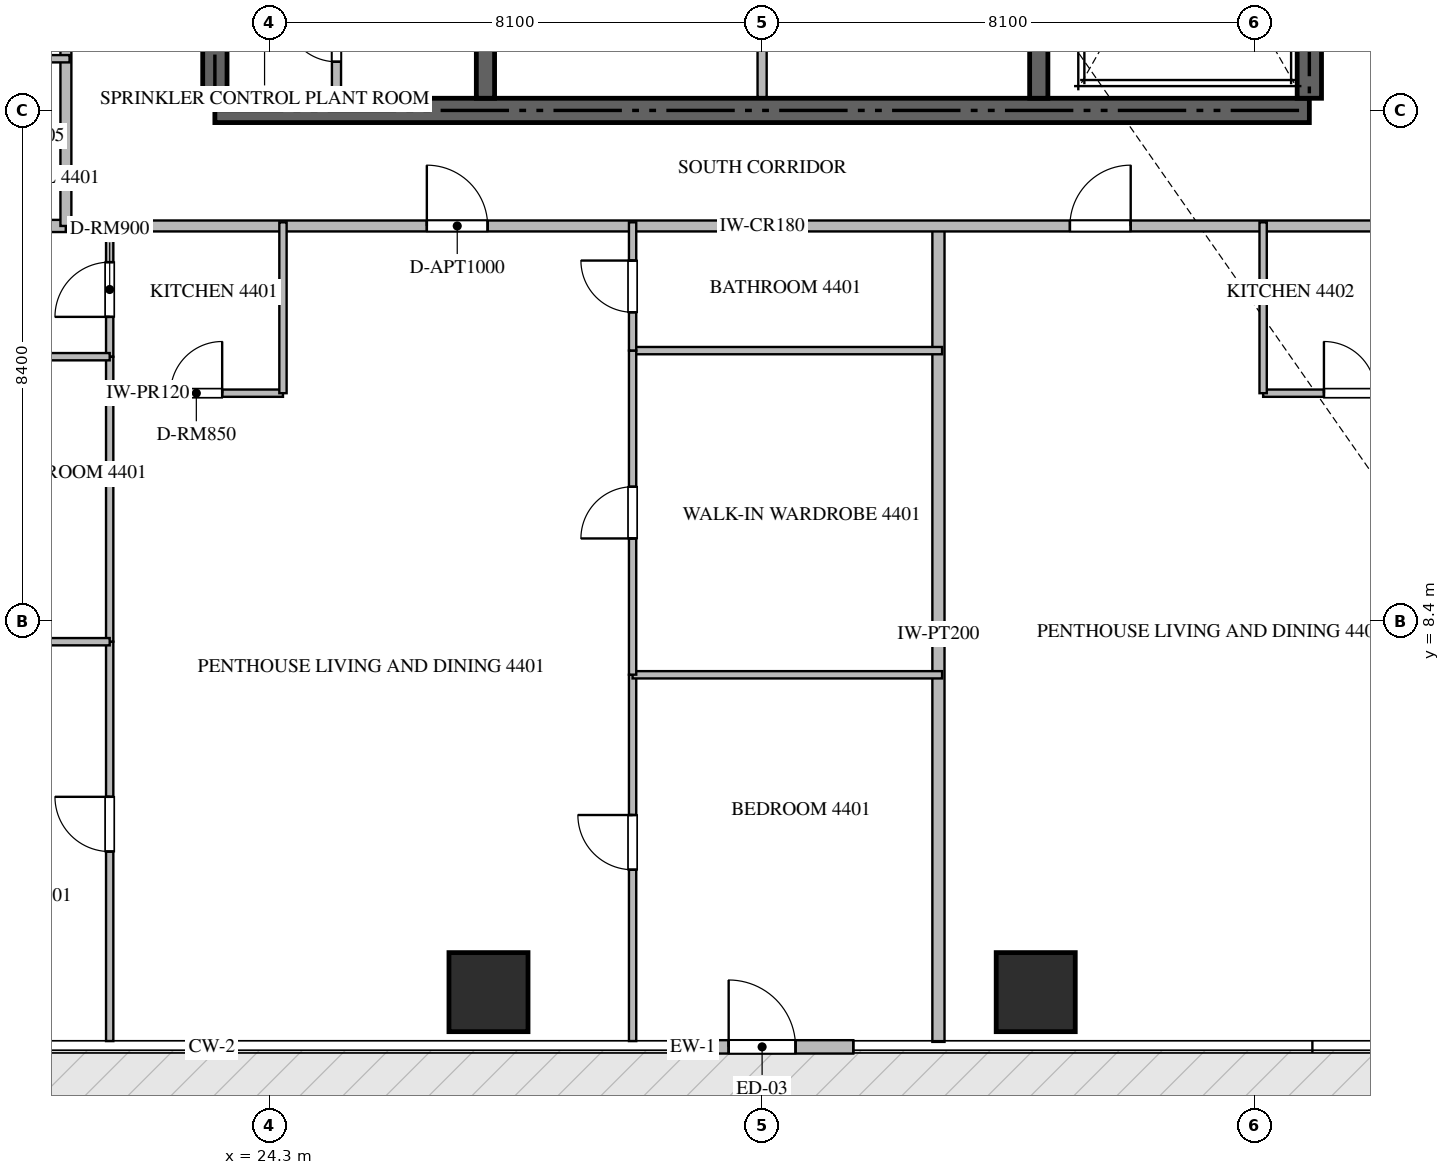
"""IFC4 building model, lengths in metres.
Left out: names, types, materials, properties, quantities, classifications, styles, units other than length and angle.
Written with IfcOpenShell. Run it as: python <this file> out.ifc"""

import sys

from ifc_helpers import new_model, si_unit, direction, frame, frame_2d, origin, origin_2d, place, context, subcontext, project, spatial, rectangle, extrude, source, transform, mapped, element, fill, save


model = new_model("IFC4")
c1 = context("Model", 3, precision=1e-05, world=origin(), true_north=direction((0.0, 1.0)))
c2 = subcontext(c1, "Body", "Model", "MODEL_VIEW")
j1 = project(units=[si_unit("LENGTHUNIT", "METRE"), si_unit("PLANEANGLEUNIT", "RADIAN")], contexts=[c1])
p1 = place(None, origin())
s1 = spatial("IfcSite", under=j1, at=p1, CompositionType="ELEMENT")
p2 = place(p1, origin())
s2 = spatial("IfcBuilding", under=s1, at=p2, CompositionType="ELEMENT")
p3 = place(p2, frame((0.0, 0.0, 176.4)))
s3 = spatial("IfcBuildingStorey", under=s2, at=p3, CompositionType="ELEMENT", Elevation=176.4)
p4 = place(p3, frame((23.4, 16.8, -0.26), z_axis=(0.0, 0.0, 1.0), x_axis=(1.0, 0.0, 0.0)))
e1 = element("IfcWall", 1, at=p4, inside=s3, PredefinedType="SHEAR", context=c2, shape_type="SweptSolid", body=[
    extrude(rectangle(XDim=18.0, YDim=0.4, at=frame_2d((9.0, 0.0))), origin(), (0.0, 0.0, 1.0), 3.748),
])
p5 = place(p3, frame((23.4, 17.0, -0.26), z_axis=(0.0, 0.0, 1.0), x_axis=(0.0, 1.0, 0.0)))
e2 = element("IfcWall", 2, at=p5, inside=s3, PredefinedType="SHEAR", context=c2, shape_type="SweptSolid", body=[
    extrude(rectangle(XDim=4.85, YDim=0.4, at=frame_2d((2.425, 0.0))), origin(), (0.0, 0.0, 1.0), 3.748),
])
p6 = place(p3, frame((41.4, 17.0, -0.26), z_axis=(0.0, 0.0, 1.0), x_axis=(0.0, 1.0, 0.0)))
e3 = element("IfcWall", 3, at=p6, inside=s3, PredefinedType="SHEAR", context=c2, shape_type="SweptSolid", body=[
    extrude(rectangle(XDim=8.35, YDim=0.4, at=frame_2d((4.175, 0.0))), origin(), (0.0, 0.0, 1.0), 3.748),
])
p7 = place(p3, frame((27.85, 17.0, -0.26), z_axis=(0.0, 0.0, 1.0), x_axis=(0.0, 1.0, 0.0)))
e4 = element("IfcWall", 4, at=p7, inside=s3, PredefinedType="SHEAR", context=c2, shape_type="SweptSolid", body=[
    extrude(rectangle(XDim=4.85, YDim=0.3, at=frame_2d((2.425, 0.0))), origin(), (0.0, 0.0, 1.0), 3.748),
])
p8 = place(p3, frame((36.95, 17.0, -0.26), z_axis=(0.0, 0.0, 1.0), x_axis=(0.0, 1.0, 0.0)))
e5 = element("IfcWall", 5, at=p8, inside=s3, PredefinedType="SHEAR", context=c2, shape_type="SweptSolid", body=[
    extrude(rectangle(XDim=8.35, YDim=0.3, at=frame_2d((4.175, 0.0))), origin(), (0.0, 0.0, 1.0), 3.748),
])
m1 = source(origin(), c2, "Body", "SweptSolid", [
    extrude(rectangle(XDim=1.3, YDim=1.3, at=origin_2d()), origin(), (0.0, 0.0, 1.0), 3.75),
])
for number, where, z_axis, x_axis in (
    (6, (27.9, 2.3, -0.26), (0.0, 0.0, 1.0), (1.0, 0.0, 0.0)),
    (7, (36.9, 2.3, -0.26), (0.0, 0.0, 1.0), (1.0, 0.0, 0.0)),
):
    element("IfcColumn", number, at=place(p3, frame(where, z_axis=z_axis, x_axis=x_axis)), inside=s3, PredefinedType="COLUMN", context=c2, shape_type="MappedRepresentation", body=[
        mapped(m1, transform((0.0, 0.0, 0.0), scale=1.0)),
    ])
p9 = place(p3, frame((30.9, 1.4, 0.0), z_axis=(0.0, 0.0, 1.0), x_axis=(1.0, 0.0, 0.0)))
e8 = element("IfcWall", 8, at=p9, inside=s3, PredefinedType="ELEMENTEDWALL", context=c2, shape_type="SweptSolid", body=[
    extrude(rectangle(XDim=3.0, YDim=0.22, at=frame_2d((1.5, 0.0))), origin(), (0.0, 0.0, 1.0), 3.475),
])
p10 = place(p9, frame((0.95, 0.0, 0.0)))
e9 = element("IfcOpeningElement", 9, at=p10, cuts=e8, PredefinedType="OPENING", context=c2, shape_type="SweptSolid", body=[
    extrude(rectangle(XDim=1.1, YDim=2.2, at=frame_2d((0.55, 1.1))), frame((0.0, 0.12, 0.0), z_axis=(0.0, -1.0, 0.0), x_axis=(1.0, 0.0, 0.0)), (0.0, 0.0, 1.0), 0.24),
])
p11 = place(p3, frame((25.4, 17.0, 0.0), z_axis=(0.0, 0.0, 1.0), x_axis=(0.0, 1.0, 0.0)))
e10 = element("IfcWall", 10, at=p11, inside=s3, PredefinedType="PARTITIONING", context=c2, shape_type="SweptSolid", body=[
    extrude(rectangle(XDim=2.05, YDim=0.15, at=frame_2d((1.025, 0.0))), origin(), (0.0, 0.0, 1.0), 3.49),
])
p12 = place(p11, frame((0.6, 0.0, 0.0)))
e11 = element("IfcOpeningElement", 11, at=p12, cuts=e10, PredefinedType="OPENING", context=c2, shape_type="SweptSolid", body=[
    extrude(rectangle(XDim=0.85, YDim=2.1, at=frame_2d((0.425, 1.05))), frame((0.0, 0.085, 0.0), z_axis=(0.0, -1.0, 0.0), x_axis=(1.0, 0.0, 0.0)), (0.0, 0.0, 1.0), 0.17),
])
p13 = place(p3, frame((32.4, 17.02, 0.0), z_axis=(0.0, 0.0, 1.0), x_axis=(0.0, 1.0, 0.0)))
e12 = element("IfcWall", 12, at=p13, inside=s3, PredefinedType="PARTITIONING", context=c2, shape_type="SweptSolid", body=[
    extrude(rectangle(XDim=2.73, YDim=0.15, at=frame_2d((1.365, 0.0))), origin(), (0.0, 0.0, 1.0), 3.49),
])
p14 = place(p3, frame((35.3, 1.482, 0.0), z_axis=(0.0, 0.0, 1.0), x_axis=(0.0, 1.0, 0.0)))
e13 = element("IfcWall", 13, at=p14, inside=s3, PredefinedType="PARTITIONING", context=c2, shape_type="SweptSolid", body=[
    extrude(rectangle(XDim=13.418, YDim=0.2, at=frame_2d((6.709, 0.0))), origin(), (0.0, 0.0, 1.0), 3.49),
])
p15 = place(p3, frame((7.882, 14.9, 0.0), z_axis=(0.0, 0.0, 1.0), x_axis=(1.0, 0.0, 0.0)))
e14 = element("IfcWall", 14, at=p15, inside=s3, PredefinedType="PARTITIONING", context=c2, shape_type="SweptSolid", body=[
    extrude(rectangle(XDim=13.068, YDim=0.2, at=frame_2d((6.534, 0.0))), origin(), (0.0, 0.0, 1.0), 3.49),
])
p16 = place(p3, frame((20.952, 14.9, 0.0), z_axis=(0.0, 0.0, 1.0), x_axis=(1.0, 0.0, 0.0)))
e15 = element("IfcWall", 15, at=p16, inside=s3, PredefinedType="PARTITIONING", context=c2, shape_type="SweptSolid", body=[
    extrude(rectangle(XDim=22.896, YDim=0.18, at=frame_2d((11.448, 0.0))), origin(), (0.0, 0.0, 1.0), 3.49),
])
p17 = place(p16, frame((5.934, 0.0, 0.0)))
e16 = element("IfcOpeningElement", 16, at=p17, cuts=e15, PredefinedType="OPENING", context=c2, shape_type="SweptSolid", body=[
    extrude(rectangle(XDim=1.0, YDim=2.15, at=frame_2d((0.5, 1.075))), frame((0.0, 0.1, 0.0), z_axis=(0.0, -1.0, 0.0), x_axis=(1.0, 0.0, 0.0)), (0.0, 0.0, 1.0), 0.2),
])
p18 = place(p16, frame((16.51, 0.0, 0.0)))
e17 = element("IfcOpeningElement", 17, at=p18, cuts=e15, PredefinedType="OPENING", context=c2, shape_type="SweptSolid", body=[
    extrude(rectangle(XDim=1.0, YDim=2.15, at=frame_2d((0.5, 1.075))), frame((0.0, 0.1, 0.0), z_axis=(0.0, -1.0, 0.0), x_axis=(1.0, 0.0, 0.0)), (0.0, 0.0, 1.0), 0.2),
])
p19 = place(p3, frame((20.95, 14.9, 0.0), z_axis=(0.0, 0.0, 1.0), x_axis=(0.0, 1.0, 0.0)))
e18 = element("IfcWall", 18, at=p19, inside=s3, PredefinedType="PARTITIONING", context=c2, shape_type="SweptSolid", body=[
    extrude(rectangle(XDim=18.7, YDim=0.18, at=frame_2d((9.35, 0.0))), origin(), (0.0, 0.0, 1.0), 3.49),
])
p20 = place(p19, frame((5.522, 0.0, 0.0)))
e19 = element("IfcOpeningElement", 19, at=p20, cuts=e18, PredefinedType="OPENING", context=c2, shape_type="SweptSolid", body=[
    extrude(rectangle(XDim=1.0, YDim=2.15, at=frame_2d((0.5, 1.075))), frame((0.0, 0.1, 0.0), z_axis=(0.0, -1.0, 0.0), x_axis=(1.0, 0.0, 0.0)), (0.0, 0.0, 1.0), 0.2),
])
p21 = place(p19, frame((10.602, 0.0, 0.0)))
e20 = element("IfcOpeningElement", 20, at=p21, cuts=e18, PredefinedType="OPENING", context=c2, shape_type="SweptSolid", body=[
    extrude(rectangle(XDim=1.0, YDim=2.15, at=frame_2d((0.5, 1.075))), frame((0.0, 0.1, 0.0), z_axis=(0.0, -1.0, 0.0), x_axis=(1.0, 0.0, 0.0)), (0.0, 0.0, 1.0), 0.2),
])
p22 = place(p3, frame((21.67, 12.15, 0.0), z_axis=(0.0, 0.0, 1.0), x_axis=(1.0, 0.0, 0.0)))
e21 = element("IfcWall", 21, at=p22, inside=s3, PredefinedType="PARTITIONING", context=c2, shape_type="SweptSolid", body=[
    extrude(rectangle(XDim=2.85, YDim=0.12, at=frame_2d((1.425, 0.0))), origin(), (0.0, 0.0, 1.0), 3.49),
])
p23 = place(p22, frame((1.0, 0.0, 0.0)))
e22 = element("IfcOpeningElement", 22, at=p23, cuts=e21, PredefinedType="OPENING", context=c2, shape_type="SweptSolid", body=[
    extrude(rectangle(XDim=0.85, YDim=2.1, at=frame_2d((0.425, 1.05))), frame((0.0, 0.07, 0.0), z_axis=(0.0, -1.0, 0.0), x_axis=(1.0, 0.0, 0.0)), (0.0, 0.0, 1.0), 0.14),
])
p24 = place(p3, frame((24.52, 12.15, 0.0), z_axis=(0.0, 0.0, 1.0), x_axis=(0.0, 1.0, 0.0)))
e23 = element("IfcWall", 23, at=p24, inside=s3, PredefinedType="PARTITIONING", context=c2, shape_type="SweptSolid", body=[
    extrude(rectangle(XDim=2.81, YDim=0.12, at=frame_2d((1.405, 0.0))), origin(), (0.0, 0.0, 1.0), 3.49),
])
p25 = place(p3, frame((21.67, 12.75, 0.0), z_axis=(0.0, 0.0, 1.0), x_axis=(0.0, 1.0, 0.0)))
e24 = element("IfcWall", 24, at=p25, inside=s3, PredefinedType="PARTITIONING", context=c2, shape_type="SweptSolid", body=[
    extrude(rectangle(XDim=2.21, YDim=0.12, at=frame_2d((1.105, 0.0))), origin(), (0.0, 0.0, 1.0), 3.49),
])
p26 = place(p25, frame((0.655, 0.0, 0.0)))
e25 = element("IfcOpeningElement", 25, at=p26, cuts=e24, PredefinedType="OPENING", context=c2, shape_type="SweptSolid", body=[
    extrude(rectangle(XDim=0.9, YDim=2.1, at=frame_2d((0.45, 1.05))), frame((0.0, 0.07, 0.0), z_axis=(0.0, -1.0, 0.0), x_axis=(1.0, 0.0, 0.0)), (0.0, 0.0, 1.0), 0.14),
])
p27 = place(p3, frame((21.67, 1.495, 0.0), z_axis=(0.0, 0.0, 1.0), x_axis=(0.0, 1.0, 0.0)))
e26 = element("IfcWall", 26, at=p27, inside=s3, PredefinedType="PARTITIONING", context=c2, shape_type="SweptSolid", body=[
    extrude(rectangle(XDim=6.568, YDim=0.12, at=frame_2d((3.284, 0.0))), origin(), (0.0, 0.0, 1.0), 3.49),
])
p28 = place(p27, frame((3.117, 0.0, 0.0)))
e27 = element("IfcOpeningElement", 27, at=p28, cuts=e26, PredefinedType="OPENING", context=c2, shape_type="SweptSolid", body=[
    extrude(rectangle(XDim=0.9, YDim=2.1, at=frame_2d((0.45, 1.05))), frame((0.0, 0.07, 0.0), z_axis=(0.0, -1.0, 0.0), x_axis=(1.0, 0.0, 0.0)), (0.0, 0.0, 1.0), 0.14),
])
p29 = place(p3, frame((21.67, 8.065, 0.0), z_axis=(0.0, 0.0, 1.0), x_axis=(0.0, 1.0, 0.0)))
e28 = element("IfcWall", 28, at=p29, inside=s3, PredefinedType="PARTITIONING", context=c2, shape_type="SweptSolid", body=[
    extrude(rectangle(XDim=4.683, YDim=0.12, at=frame_2d((2.342, 0.0))), origin(), (0.0, 0.0, 1.0), 3.49),
])
p30 = place(p3, frame((16.52, 8.063, 0.0), z_axis=(0.0, 0.0, 1.0), x_axis=(1.0, 0.0, 0.0)))
e29 = element("IfcWall", 29, at=p30, inside=s3, PredefinedType="PARTITIONING", context=c2, shape_type="SweptSolid", body=[
    extrude(rectangle(XDim=5.15, YDim=0.12, at=frame_2d((2.575, 0.0))), origin(), (0.0, 0.0, 1.0), 3.49),
])
p31 = place(p3, frame((18.622, 12.75, 0.0), z_axis=(0.0, 0.0, 1.0), x_axis=(1.0, 0.0, 0.0)))
e30 = element("IfcWall", 30, at=p31, inside=s3, PredefinedType="PARTITIONING", context=c2, shape_type="SweptSolid", body=[
    extrude(rectangle(XDim=3.048, YDim=0.12, at=frame_2d((1.524, 0.0))), origin(), (0.0, 0.0, 1.0), 3.49),
])
p32 = place(p31, frame((1.099, 0.0, 0.0)))
e31 = element("IfcOpeningElement", 31, at=p32, cuts=e30, PredefinedType="OPENING", context=c2, shape_type="SweptSolid", body=[
    extrude(rectangle(XDim=0.85, YDim=2.1, at=frame_2d((0.425, 1.05))), frame((0.0, 0.07, 0.0), z_axis=(0.0, -1.0, 0.0), x_axis=(1.0, 0.0, 0.0)), (0.0, 0.0, 1.0), 0.14),
])
p33 = place(p3, frame((30.27, 1.495, 0.0), z_axis=(0.0, 0.0, 1.0), x_axis=(0.0, 1.0, 0.0)))
e32 = element("IfcWall", 32, at=p33, inside=s3, PredefinedType="PARTITIONING", context=c2, shape_type="SweptSolid", body=[
    extrude(rectangle(XDim=6.024, YDim=0.12, at=frame_2d((3.012, 0.0))), origin(), (0.0, 0.0, 1.0), 3.49),
])
p34 = place(p33, frame((2.818, 0.0, 0.0)))
e33 = element("IfcOpeningElement", 33, at=p34, cuts=e32, PredefinedType="OPENING", context=c2, shape_type="SweptSolid", body=[
    extrude(rectangle(XDim=0.9, YDim=2.1, at=frame_2d((0.45, 1.05))), frame((0.0, 0.07, 0.0), z_axis=(0.0, -1.0, 0.0), x_axis=(1.0, 0.0, 0.0)), (0.0, 0.0, 1.0), 0.14),
])
for number, where, z_axis, x_axis in (
    (34, (30.27, 7.519, 0.0), (0.0, 0.0, 1.0), (1.0, 0.0, 0.0)),
    (35, (30.27, 12.85, 0.0), (0.0, 0.0, 1.0), (1.0, 0.0, 0.0)),
):
    element("IfcWall", number, at=place(p3, frame(where, z_axis=z_axis, x_axis=x_axis)), inside=s3, PredefinedType="PARTITIONING", context=c2, shape_type="SweptSolid", body=[
        extrude(rectangle(XDim=5.09, YDim=0.12, at=frame_2d((2.545, 0.0))), origin(), (0.0, 0.0, 1.0), 3.49),
    ])
p35 = place(p3, frame((30.27, 7.521, 0.0), z_axis=(0.0, 0.0, 1.0), x_axis=(0.0, 1.0, 0.0)))
e36 = element("IfcWall", 36, at=p35, inside=s3, PredefinedType="PARTITIONING", context=c2, shape_type="SweptSolid", body=[
    extrude(rectangle(XDim=5.329, YDim=0.12, at=frame_2d((2.665, 0.0))), origin(), (0.0, 0.0, 1.0), 3.49),
])
p36 = place(p35, frame((2.24, 0.0, 0.0)))
e37 = element("IfcOpeningElement", 37, at=p36, cuts=e36, PredefinedType="OPENING", context=c2, shape_type="SweptSolid", body=[
    extrude(rectangle(XDim=0.85, YDim=2.1, at=frame_2d((0.425, 1.05))), frame((0.0, 0.07, 0.0), z_axis=(0.0, -1.0, 0.0), x_axis=(1.0, 0.0, 0.0)), (0.0, 0.0, 1.0), 0.14),
])
p37 = place(p3, frame((30.27, 12.852, 0.0), z_axis=(0.0, 0.0, 1.0), x_axis=(0.0, 1.0, 0.0)))
e38 = element("IfcWall", 38, at=p37, inside=s3, PredefinedType="PARTITIONING", context=c2, shape_type="SweptSolid", body=[
    extrude(rectangle(XDim=2.108, YDim=0.12, at=frame_2d((1.054, 0.0))), origin(), (0.0, 0.0, 1.0), 3.49),
])
p38 = place(p37, frame((0.629, 0.0, 0.0)))
e39 = element("IfcOpeningElement", 39, at=p38, cuts=e38, PredefinedType="OPENING", context=c2, shape_type="SweptSolid", body=[
    extrude(rectangle(XDim=0.85, YDim=2.1, at=frame_2d((0.425, 1.05))), frame((0.0, 0.07, 0.0), z_axis=(0.0, -1.0, 0.0), x_axis=(1.0, 0.0, 0.0)), (0.0, 0.0, 1.0), 0.14),
])
p39 = place(p3, frame((40.64, 12.15, 0.0), z_axis=(0.0, 0.0, 1.0), x_axis=(1.0, 0.0, 0.0)))
e40 = element("IfcWall", 40, at=p39, inside=s3, PredefinedType="PARTITIONING", context=c2, shape_type="SweptSolid", body=[
    extrude(rectangle(XDim=2.85, YDim=0.12, at=frame_2d((1.425, 0.0))), origin(), (0.0, 0.0, 1.0), 3.49),
])
p40 = place(p39, frame((1.0, 0.0, 0.0)))
e41 = element("IfcOpeningElement", 41, at=p40, cuts=e40, PredefinedType="OPENING", context=c2, shape_type="SweptSolid", body=[
    extrude(rectangle(XDim=0.85, YDim=2.1, at=frame_2d((0.425, 1.05))), frame((0.0, 0.07, 0.0), z_axis=(0.0, -1.0, 0.0), x_axis=(1.0, 0.0, 0.0)), (0.0, 0.0, 1.0), 0.14),
])
p41 = place(p3, frame((40.64, 12.15, 0.0), z_axis=(0.0, 0.0, 1.0), x_axis=(0.0, 1.0, 0.0)))
e42 = element("IfcWall", 42, at=p41, inside=s3, PredefinedType="PARTITIONING", context=c2, shape_type="SweptSolid", body=[
    extrude(rectangle(XDim=2.81, YDim=0.12, at=frame_2d((1.405, 0.0))), origin(), (0.0, 0.0, 1.0), 3.49),
])
p42 = place(p3, frame((18.402, 17.65, 0.0), z_axis=(0.0, 0.0, 1.0), x_axis=(1.0, 0.0, 0.0)))
e43 = element("IfcWall", 43, at=p42, inside=s3, PredefinedType="PARTITIONING", context=c2, shape_type="SweptSolid", body=[
    extrude(rectangle(XDim=2.608, YDim=0.12, at=frame_2d((1.304, 0.0))), origin(), (0.0, 0.0, 1.0), 3.49),
])
p43 = place(p42, frame((0.879, 0.0, 0.0)))
e44 = element("IfcOpeningElement", 44, at=p43, cuts=e43, PredefinedType="OPENING", context=c2, shape_type="SweptSolid", body=[
    extrude(rectangle(XDim=0.85, YDim=2.1, at=frame_2d((0.425, 1.05))), frame((0.0, 0.07, 0.0), z_axis=(0.0, -1.0, 0.0), x_axis=(1.0, 0.0, 0.0)), (0.0, 0.0, 1.0), 0.14),
])
m2 = source(origin(), c2, "Body", "SweptSolid", [
    extrude(rectangle(XDim=1.1, YDim=2.2, at=frame_2d((0.55, 1.1))), frame((0.0, 0.025, 0.0), z_axis=(0.0, -1.0, 0.0), x_axis=(1.0, 0.0, 0.0)), (0.0, 0.0, 1.0), 0.05),
])
p44 = place(p10, origin())
e45 = element("IfcDoor", 45, at=p44, inside=s3, OperationType="SINGLE_SWING_LEFT", PredefinedType="DOOR", context=c2, shape_type="MappedRepresentation", body=[
    mapped(m2, transform((0.0, 0.0, 0.0), scale=1.0)),
])
fill(e9, e45)
m3 = source(origin(), c2, "Body", "SweptSolid", [
    extrude(rectangle(XDim=0.85, YDim=2.1, at=frame_2d((0.425, 1.05))), frame((0.0, 0.025, 0.0), z_axis=(0.0, -1.0, 0.0), x_axis=(1.0, 0.0, 0.0)), (0.0, 0.0, 1.0), 0.05),
])
p45 = place(p12, origin())
e46 = element("IfcDoor", 46, at=p45, inside=s3, OperationType="SINGLE_SWING_RIGHT", PredefinedType="DOOR", context=c2, shape_type="MappedRepresentation", body=[
    mapped(m3, transform((0.0, 0.0, 0.0), scale=1.0)),
])
fill(e11, e46)
m4 = source(origin(), c2, "Body", "SweptSolid", [
    extrude(rectangle(XDim=1.0, YDim=2.15, at=frame_2d((0.5, 1.075))), frame((0.0, 0.025, 0.0), z_axis=(0.0, -1.0, 0.0), x_axis=(1.0, 0.0, 0.0)), (0.0, 0.0, 1.0), 0.05),
])
p46 = place(p17, origin())
e47 = element("IfcDoor", 47, at=p46, inside=s3, OperationType="SINGLE_SWING_LEFT", PredefinedType="DOOR", context=c2, shape_type="MappedRepresentation", body=[
    mapped(m4, transform((0.0, 0.0, 0.0), scale=1.0)),
])
fill(e16, e47)
p47 = place(p18, origin())
e48 = element("IfcDoor", 48, at=p47, inside=s3, OperationType="SINGLE_SWING_RIGHT", PredefinedType="DOOR", context=c2, shape_type="MappedRepresentation", body=[
    mapped(m4, transform((0.0, 0.0, 0.0), scale=1.0)),
])
fill(e17, e48)
p48 = place(p23, origin())
e49 = element("IfcDoor", 49, at=p48, inside=s3, OperationType="SINGLE_SWING_RIGHT", PredefinedType="DOOR", context=c2, shape_type="MappedRepresentation", body=[
    mapped(m3, transform((0.0, 0.0, 0.0), scale=1.0)),
])
fill(e22, e49)
m5 = source(origin(), c2, "Body", "SweptSolid", [
    extrude(rectangle(XDim=0.9, YDim=2.1, at=frame_2d((0.45, 1.05))), frame((0.0, 0.025, 0.0), z_axis=(0.0, -1.0, 0.0), x_axis=(1.0, 0.0, 0.0)), (0.0, 0.0, 1.0), 0.05),
])
p49 = place(p26, origin())
e50 = element("IfcDoor", 50, at=p49, inside=s3, OperationType="SINGLE_SWING_LEFT", PredefinedType="DOOR", context=c2, shape_type="MappedRepresentation", body=[
    mapped(m5, transform((0.0, 0.0, 0.0), scale=1.0)),
])
fill(e25, e50)
p50 = place(p28, origin())
e51 = element("IfcDoor", 51, at=p50, inside=s3, OperationType="SINGLE_SWING_RIGHT", PredefinedType="DOOR", context=c2, shape_type="MappedRepresentation", body=[
    mapped(m5, transform((0.0, 0.0, 0.0), scale=1.0)),
])
fill(e27, e51)
p51 = place(p34, origin())
e52 = element("IfcDoor", 52, at=p51, inside=s3, OperationType="SINGLE_SWING_RIGHT", PredefinedType="DOOR", context=c2, shape_type="MappedRepresentation", body=[
    mapped(m5, transform((0.0, 0.0, 0.0), scale=1.0)),
])
fill(e33, e52)
p52 = place(p36, origin())
e53 = element("IfcDoor", 53, at=p52, inside=s3, OperationType="SINGLE_SWING_LEFT", PredefinedType="DOOR", context=c2, shape_type="MappedRepresentation", body=[
    mapped(m3, transform((0.0, 0.0, 0.0), scale=1.0)),
])
fill(e37, e53)
p53 = place(p38, origin())
e54 = element("IfcDoor", 54, at=p53, inside=s3, OperationType="SINGLE_SWING_RIGHT", PredefinedType="DOOR", context=c2, shape_type="MappedRepresentation", body=[
    mapped(m3, transform((0.0, 0.0, 0.0), scale=1.0)),
])
fill(e39, e54)
p54 = place(p40, origin())
e55 = element("IfcDoor", 55, at=p54, inside=s3, OperationType="SINGLE_SWING_LEFT", PredefinedType="DOOR", context=c2, shape_type="MappedRepresentation", body=[
    mapped(m3, transform((0.0, 0.0, 0.0), scale=1.0)),
])
fill(e41, e55)
save(model, sys.argv[1])
